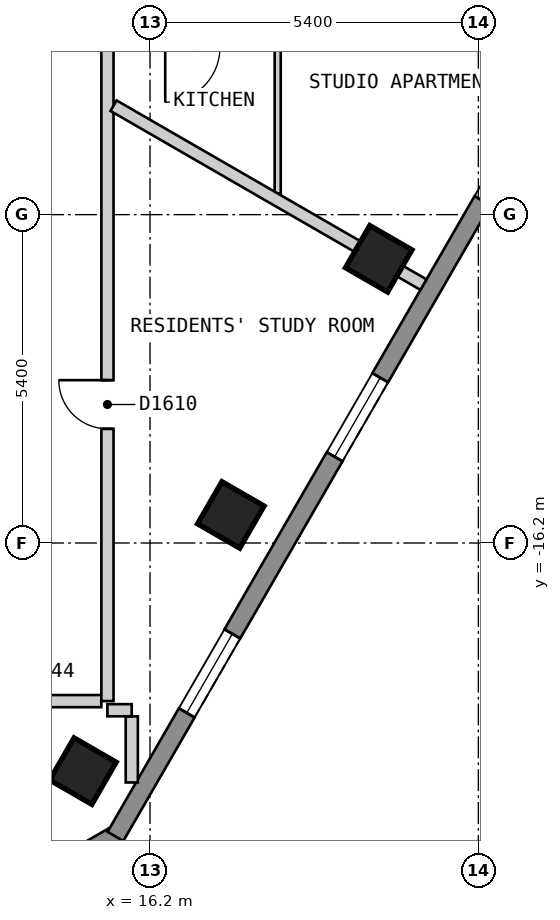
"""IFC4 building model, lengths in metres.
Left out: names, types, materials, properties, quantities, classifications, styles, units other than length and angle.
Written with IfcOpenShell. Run it as: python <this file> out.ifc"""

import sys

from ifc_helpers import new_model, si_unit, direction, frame, frame_2d, origin, origin_2d, place, context, subcontext, project, spatial, polyline, rectangle, outline, extrude, element, fill, save


model = new_model("IFC4")
c1 = context("Model", 3, precision=1e-05, world=origin(), true_north=direction((0.0, 1.0)))
c2 = subcontext(c1, "Body", "Model", "MODEL_VIEW")
j1 = project(units=[si_unit("LENGTHUNIT", "METRE"), si_unit("PLANEANGLEUNIT", "RADIAN")], contexts=[c1])
p1 = place(None, origin())
s1 = spatial("IfcSite", under=j1, at=p1, CompositionType="ELEMENT")
p2 = place(p1, origin())
s2 = spatial("IfcBuilding", under=s1, at=p2, CompositionType="ELEMENT")
p3 = place(p2, frame((0.0, 0.0, 169.2)))
s3 = spatial("IfcBuildingStorey", under=s2, at=p3, CompositionType="ELEMENT", Elevation=169.2)
for number, where, z_axis, x_axis in (
    (1, (15.097, -19.951, 0.0), (0.0, 0.0, 1.0), (0.5, 0.866, 0.0)),
    (2, (17.529, -15.738, 0.0), (0.0, 0.0, 1.0), (0.5, 0.866, 0.0)),
    (3, (19.961, -11.526, 0.0), (0.0, 0.0, 1.0), (0.5, 0.866, 0.0)),
):
    element("IfcColumn", number, at=place(p3, frame(where, z_axis=z_axis, x_axis=x_axis)), inside=s3, PredefinedType="COLUMN", context=c2, shape_type="SweptSolid", body=[
        extrude(rectangle(XDim=0.8, YDim=0.8, at=origin_2d()), origin(), (0.0, 0.0, 1.0), 3.0),
    ])
p4 = place(p3, frame((11.356, -23.47, 0.0), z_axis=(0.0, 0.0, 1.0), x_axis=(0.866022959057, 0.500004234368, 0.0)))
e4 = element("IfcWall", 4, at=p4, inside=s3, PredefinedType="SOLIDWALL", context=c2, shape_type="SweptSolid", body=[
    extrude(outline(polyline([(0.0, -0.15), (5.0, -0.15), (4.92, 0.15), (0.08, 0.15), (0.0, -0.15)])), origin(), (0.0, 0.0, 1.0), 2.7),
])
p5 = place(p4, frame((0.65, 0.0, 0.15)))
e5 = element("IfcOpeningElement", 5, at=p5, cuts=e4, PredefinedType="OPENING", context=c2, shape_type="SweptSolid", body=[
    extrude(rectangle(XDim=1.2, YDim=2.1, at=frame_2d((0.6, 1.05))), frame((0.0, 0.16, 0.0), z_axis=(0.0, -1.0, 0.0), x_axis=(1.0, 0.0, 0.0)), (0.0, 0.0, 1.0), 0.32),
])
p6 = place(p3, frame((15.631, -21.025, 0.0), z_axis=(0.0, 0.0, 1.0), x_axis=(0.500018670445, 0.86601462413, 0.0)))
e6 = element("IfcWall", 6, at=p6, inside=s3, PredefinedType="SOLIDWALL", context=c2, shape_type="SweptSolid", body=[
    extrude(outline(polyline([(0.0, -0.15), (20.785, -0.15), (20.705, 0.15), (0.08, 0.15), (0.0, -0.15)])), origin(), (0.0, 0.0, 1.0), 2.7),
])
p7 = place(p6, frame((2.346, 0.0, 0.15)))
e7 = element("IfcOpeningElement", 7, at=p7, cuts=e6, PredefinedType="OPENING", context=c2, shape_type="SweptSolid", body=[
    extrude(rectangle(XDim=1.5, YDim=2.1, at=frame_2d((0.75, 1.05))), frame((0.0, 0.16, 0.0), z_axis=(0.0, -1.0, 0.0), x_axis=(1.0, 0.0, 0.0)), (0.0, 0.0, 1.0), 0.32),
])
p8 = place(p6, frame((7.21, 0.0, 0.15)))
e8 = element("IfcOpeningElement", 8, at=p8, cuts=e6, PredefinedType="OPENING", context=c2, shape_type="SweptSolid", body=[
    extrude(rectangle(XDim=1.5, YDim=2.1, at=frame_2d((0.75, 1.05))), frame((0.0, 0.16, 0.0), z_axis=(0.0, -1.0, 0.0), x_axis=(1.0, 0.0, 0.0)), (0.0, 0.0, 1.0), 0.32),
])
p9 = place(p6, frame((12.073, 0.0, 0.15)))
e9 = element("IfcOpeningElement", 9, at=p9, cuts=e6, PredefinedType="OPENING", context=c2, shape_type="SweptSolid", body=[
    extrude(rectangle(XDim=1.5, YDim=2.1, at=frame_2d((0.75, 1.05))), frame((0.0, 0.16, 0.0), z_axis=(0.0, -1.0, 0.0), x_axis=(1.0, 0.0, 0.0)), (0.0, 0.0, 1.0), 0.32),
])
p10 = place(p6, frame((16.938, 0.0, 0.15)))
e10 = element("IfcOpeningElement", 10, at=p10, cuts=e6, PredefinedType="OPENING", context=c2, shape_type="SweptSolid", body=[
    extrude(rectangle(XDim=1.5, YDim=2.1, at=frame_2d((0.75, 1.05))), frame((0.0, 0.16, 0.0), z_axis=(0.0, -1.0, 0.0), x_axis=(1.0, 0.0, 0.0)), (0.0, 0.0, 1.0), 0.32),
])
p11 = place(p3, frame((13.3, -18.8, 0.0), z_axis=(0.0, 0.0, 1.0), x_axis=(1.0, 0.0, 0.0)))
e11 = element("IfcWall", 11, at=p11, inside=s3, PredefinedType="PARTITIONING", context=c2, shape_type="SweptSolid", body=[
    extrude(rectangle(XDim=2.099, YDim=0.2, at=frame_2d((1.049, 0.0))), origin(), (0.0, 0.0, 1.0), 2.7),
])
p12 = place(p11, frame((0.2, 0.0, 0.0)))
e12 = element("IfcOpeningElement", 12, at=p12, cuts=e11, PredefinedType="OPENING", context=c2, shape_type="SweptSolid", body=[
    extrude(rectangle(XDim=1.0, YDim=2.1, at=frame_2d((0.5, 1.05))), frame((0.0, 0.11, 0.0), z_axis=(0.0, -1.0, 0.0), x_axis=(1.0, 0.0, 0.0)), (0.0, 0.0, 1.0), 0.22),
])
p13 = place(p3, frame((15.5, -18.799, 0.0), z_axis=(0.0, 0.0, 1.0), x_axis=(0.0, 1.0, 0.0)))
e13 = element("IfcWall", 13, at=p13, inside=s3, PredefinedType="PARTITIONING", context=c2, shape_type="SweptSolid", body=[
    extrude(rectangle(XDim=15.349, YDim=0.2, at=frame_2d((7.675, 0.0))), origin(), (0.0, 0.0, 1.0), 2.7),
])
p14 = place(p13, frame((4.477, 0.0, 0.0)))
e14 = element("IfcOpeningElement", 14, at=p14, cuts=e13, PredefinedType="OPENING", context=c2, shape_type="SweptSolid", body=[
    extrude(rectangle(XDim=0.8, YDim=2.1, at=frame_2d((0.4, 1.05))), frame((0.0, 0.11, 0.0), z_axis=(0.0, -1.0, 0.0), x_axis=(1.0, 0.0, 0.0)), (0.0, 0.0, 1.0), 0.22),
])
p15 = place(p13, frame((11.348, 0.0, 0.0)))
e15 = element("IfcOpeningElement", 15, at=p15, cuts=e13, PredefinedType="OPENING", context=c2, shape_type="SweptSolid", body=[
    extrude(rectangle(XDim=1.0, YDim=2.1, at=frame_2d((0.5, 1.05))), frame((0.0, 0.11, 0.0), z_axis=(0.0, -1.0, 0.0), x_axis=(1.0, 0.0, 0.0)), (0.0, 0.0, 1.0), 0.22),
])
p16 = place(p3, frame((18.3, -10.452, 0.0), z_axis=(0.0, 0.0, 1.0), x_axis=(0.0, 1.0, 0.0)))
e16 = element("IfcWall", 16, at=p16, inside=s3, PredefinedType="PARTITIONING", context=c2, shape_type="SweptSolid", body=[
    extrude(rectangle(XDim=5.386, YDim=0.1, at=frame_2d((2.693, 0.0))), origin(), (0.0, 0.0, 1.0), 2.7),
])
p17 = place(p16, frame((3.051, 0.0, 0.0)))
e17 = element("IfcOpeningElement", 17, at=p17, cuts=e16, PredefinedType="OPENING", context=c2, shape_type="SweptSolid", body=[
    extrude(rectangle(XDim=0.9, YDim=2.1, at=frame_2d((0.45, 1.05))), frame((0.0, 0.06, 0.0), z_axis=(0.0, -1.0, 0.0), x_axis=(1.0, 0.0, 0.0)), (0.0, 0.0, 1.0), 0.12),
])
p18 = place(p3, frame((15.9, -19.051, 0.0), z_axis=(0.0, 0.0, 1.0), x_axis=(0.0, -1.0, 0.0)))
e18 = element("IfcWall", 18, at=p18, inside=s3, PredefinedType="PARTITIONING", context=c2, shape_type="SweptSolid", body=[
    extrude(rectangle(XDim=1.087, YDim=0.2, at=frame_2d((0.543, 0.0))), origin(), (0.0, 0.0, 1.0), 2.7),
])
p19 = place(p3, frame((15.6, -9.008, 0.0), z_axis=(0.0, 0.0, 1.0), x_axis=(0.866013576751, -0.500020484464, 0.0)))
e19 = element("IfcWall", 19, at=p19, inside=s3, PredefinedType="PARTITIONING", context=c2, shape_type="SweptSolid", body=[
    extrude(rectangle(XDim=5.885, YDim=0.2, at=frame_2d((2.943, 0.0))), origin(), (0.0, 0.0, 1.0), 2.7),
])
p20 = place(p3, frame((15.499, -18.95, 0.0), z_axis=(0.0, 0.0, 1.0), x_axis=(1.0, 0.0, 0.0)))
e20 = element("IfcWall", 20, at=p20, inside=s3, PredefinedType="PARTITIONING", context=c2, shape_type="SweptSolid", body=[
    extrude(rectangle(XDim=0.4, YDim=0.2, at=frame_2d((0.2, 0.0))), origin(), (0.0, 0.0, 1.0), 2.7),
])
p21 = place(p7, origin())
e21 = element("IfcWindow", 21, at=p21, inside=s3, PartitioningType="SINGLE_PANEL", PredefinedType="WINDOW", context=c2, shape_type="SweptSolid", body=[
    extrude(rectangle(XDim=1.5, YDim=2.1, at=frame_2d((0.75, 1.05))), frame((0.0, 0.03, 0.0), z_axis=(0.0, -1.0, 0.0), x_axis=(1.0, 0.0, 0.0)), (0.0, 0.0, 1.0), 0.06),
])
fill(e7, e21)
p22 = place(p8, origin())
e22 = element("IfcWindow", 22, at=p22, inside=s3, PartitioningType="SINGLE_PANEL", PredefinedType="WINDOW", context=c2, shape_type="SweptSolid", body=[
    extrude(rectangle(XDim=1.5, YDim=2.1, at=frame_2d((0.75, 1.05))), frame((0.0, 0.03, 0.0), z_axis=(0.0, -1.0, 0.0), x_axis=(1.0, 0.0, 0.0)), (0.0, 0.0, 1.0), 0.06),
])
fill(e8, e22)
p23 = place(p9, origin())
e23 = element("IfcWindow", 23, at=p23, inside=s3, PartitioningType="SINGLE_PANEL", PredefinedType="WINDOW", context=c2, shape_type="SweptSolid", body=[
    extrude(rectangle(XDim=1.5, YDim=2.1, at=frame_2d((0.75, 1.05))), frame((0.0, 0.03, 0.0), z_axis=(0.0, -1.0, 0.0), x_axis=(1.0, 0.0, 0.0)), (0.0, 0.0, 1.0), 0.06),
])
fill(e9, e23)
p24 = place(p14, origin())
e24 = element("IfcDoor", 24, at=p24, inside=s3, OperationType="SINGLE_SWING_RIGHT", PredefinedType="DOOR", context=c2, shape_type="SweptSolid", body=[
    extrude(rectangle(XDim=0.8, YDim=2.1, at=frame_2d((0.4, 1.05))), frame((0.0, 0.025, 0.0), z_axis=(0.0, -1.0, 0.0), x_axis=(1.0, 0.0, 0.0)), (0.0, 0.0, 1.0), 0.05),
])
fill(e14, e24)
save(model, sys.argv[1])
